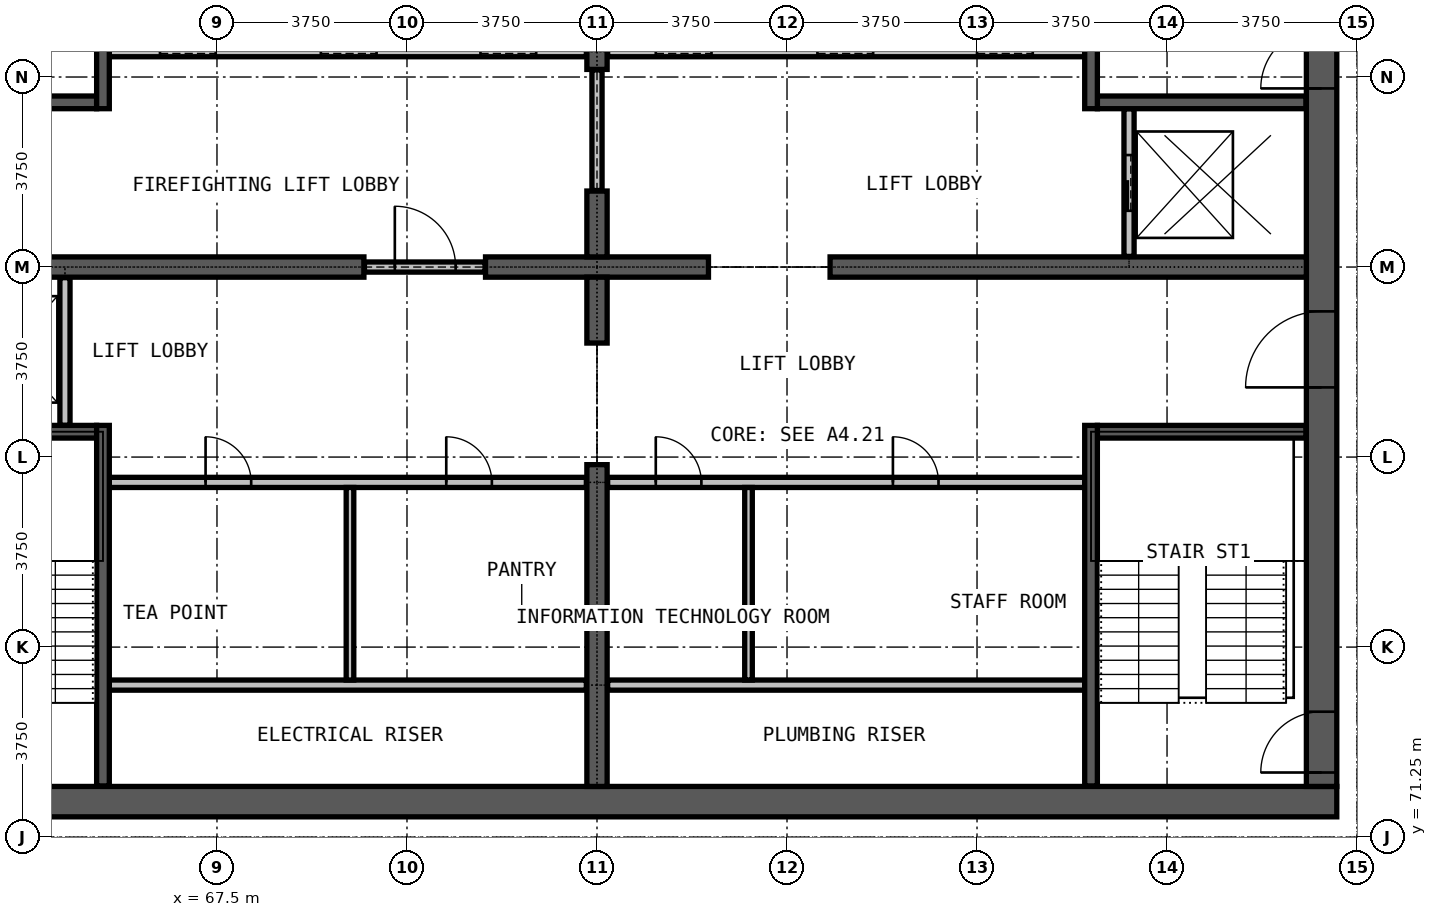
"""IFC4 building model, lengths in metres.
Left out: names, types, materials, properties, quantities, classifications, styles, units other than length and angle.
Written with IfcOpenShell. Run it as: python <this file> out.ifc"""

import sys

from ifc_helpers import new_model, si_unit, direction, frame, frame_2d, origin, place, context, subcontext, project, spatial, rectangle, extrude, element, fill, save


model = new_model("IFC4")
c1 = context("Model", 3, precision=1e-05, world=origin(), true_north=direction((0.0, 1.0)))
c2 = subcontext(c1, "Body", "Model", "MODEL_VIEW")
j1 = project(units=[si_unit("LENGTHUNIT", "METRE"), si_unit("PLANEANGLEUNIT", "RADIAN")], contexts=[c1])
p1 = place(None, origin())
s1 = spatial("IfcSite", under=j1, at=p1, CompositionType="ELEMENT")
p2 = place(p1, origin())
s2 = spatial("IfcBuilding", under=s1, at=p2, CompositionType="ELEMENT")
p3 = place(p2, frame((0.0, 0.0, 239.1)))
s3 = spatial("IfcBuildingStorey", under=s2, at=p3, CompositionType="ELEMENT", Elevation=239.1)
p4 = place(p3, frame((60.4, 71.95, 0.0), z_axis=(0.0, 0.0, 1.0), x_axis=(1.0, 0.0, 0.0)))
e1 = element("IfcWall", 1, at=p4, inside=s3, PredefinedType="SHEAR", context=c2, shape_type="SweptSolid", body=[
    extrude(rectangle(XDim=29.2, YDim=0.6, at=frame_2d((14.6, 0.0))), origin(), (0.0, 0.0, 1.0), 3.6),
])
p5 = place(p3, frame((89.3, 72.25, 0.0), z_axis=(0.0, 0.0, 1.0), x_axis=(0.0, 1.0, 0.0)))
e2 = element("IfcWall", 2, at=p5, inside=s3, PredefinedType="SHEAR", context=c2, shape_type="SweptSolid", body=[
    extrude(rectangle(XDim=20.5, YDim=0.6, at=frame_2d((10.25, 0.0))), origin(), (0.0, 0.0, 1.0), 3.6),
])
p6 = place(p5, frame((0.275, 0.0, 0.0)))
e3 = element("IfcOpeningElement", 3, at=p6, cuts=e2, PredefinedType="OPENING", context=c2, shape_type="SweptSolid", body=[
    extrude(rectangle(XDim=1.2, YDim=2.2, at=frame_2d((0.6, 1.1))), frame((0.0, 0.31, 0.0), z_axis=(0.0, -1.0, 0.0), x_axis=(1.0, 0.0, 0.0)), (0.0, 0.0, 1.0), 0.62),
])
p7 = place(p5, frame((13.775, 0.0, 0.0)))
e4 = element("IfcOpeningElement", 4, at=p7, cuts=e2, PredefinedType="OPENING", context=c2, shape_type="SweptSolid", body=[
    extrude(rectangle(XDim=1.2, YDim=2.2, at=frame_2d((0.6, 1.1))), frame((0.0, 0.31, 0.0), z_axis=(0.0, -1.0, 0.0), x_axis=(1.0, 0.0, 0.0)), (0.0, 0.0, 1.0), 0.62),
])
p8 = place(p5, frame((7.875, 0.0, 0.0)))
e5 = element("IfcOpeningElement", 5, at=p8, cuts=e2, PredefinedType="OPENING", context=c2, shape_type="SweptSolid", body=[
    extrude(rectangle(XDim=1.5, YDim=2.2, at=frame_2d((0.75, 1.1))), frame((0.0, 0.31, 0.0), z_axis=(0.0, -1.0, 0.0), x_axis=(1.0, 0.0, 0.0)), (0.0, 0.0, 1.0), 0.62),
])
p9 = place(p3, frame((61.0, 82.5, 0.0), z_axis=(0.0, 0.0, 1.0), x_axis=(1.0, 0.0, 0.0)))
e6 = element("IfcWall", 6, at=p9, inside=s3, PredefinedType="SHEAR", context=c2, shape_type="SweptSolid", body=[
    extrude(rectangle(XDim=9.4, YDim=0.4, at=frame_2d((4.7, 0.0))), origin(), (0.0, 0.0, 1.0), 3.6),
])
p10 = place(p3, frame((72.8, 82.5, 0.0), z_axis=(0.0, 0.0, 1.0), x_axis=(1.0, 0.0, 0.0)))
e7 = element("IfcWall", 7, at=p10, inside=s3, PredefinedType="SHEAR", context=c2, shape_type="SweptSolid", body=[
    extrude(rectangle(XDim=4.4, YDim=0.4, at=frame_2d((2.2, 0.0))), origin(), (0.0, 0.0, 1.0), 3.6),
])
p11 = place(p3, frame((79.6, 82.5, 0.0), z_axis=(0.0, 0.0, 1.0), x_axis=(1.0, 0.0, 0.0)))
e8 = element("IfcWall", 8, at=p11, inside=s3, PredefinedType="SHEAR", context=c2, shape_type="SweptSolid", body=[
    extrude(rectangle(XDim=9.4, YDim=0.4, at=frame_2d((4.7, 0.0))), origin(), (0.0, 0.0, 1.0), 3.6),
])
p12 = place(p3, frame((75.0, 72.25, 0.0), z_axis=(0.0, 0.0, 1.0), x_axis=(0.0, 1.0, 0.0)))
e9 = element("IfcWall", 9, at=p12, inside=s3, PredefinedType="SHEAR", context=c2, shape_type="SweptSolid", body=[
    extrude(rectangle(XDim=6.35, YDim=0.4, at=frame_2d((3.175, 0.0))), origin(), (0.0, 0.0, 1.0), 3.6),
])
for number, where, z_axis, x_axis in (
    (10, (75.0, 81.0, 0.0), (0.0, 0.0, 1.0), (0.0, 1.0, 0.0)),
    (11, (75.0, 82.7, 0.0), (0.0, 0.0, 1.0), (0.0, 1.0, 0.0)),
):
    element("IfcWall", number, at=place(p3, frame(where, z_axis=z_axis, x_axis=x_axis)), inside=s3, PredefinedType="SHEAR", context=c2, shape_type="SweptSolid", body=[
        extrude(rectangle(XDim=1.3, YDim=0.4, at=frame_2d((0.65, 0.0))), origin(), (0.0, 0.0, 1.0), 3.6),
    ])
p13 = place(p3, frame((75.0, 86.4, 0.0), z_axis=(0.0, 0.0, 1.0), x_axis=(0.0, 1.0, 0.0)))
e12 = element("IfcWall", 12, at=p13, inside=s3, PredefinedType="SHEAR", context=c2, shape_type="SweptSolid", body=[
    extrude(rectangle(XDim=6.35, YDim=0.4, at=frame_2d((3.175, 0.0))), origin(), (0.0, 0.0, 1.0), 3.6),
])
for number, where, z_axis, x_axis in (
    (13, (65.375, 74.25, 0.0), (0.0, 0.0, 1.0), (1.0, 0.0, 0.0)),
    (14, (75.21, 74.25, 0.0), (0.0, 0.0, 1.0), (1.0, 0.0, 0.0)),
):
    element("IfcWall", number, at=place(p3, frame(where, z_axis=z_axis, x_axis=x_axis)), inside=s3, PredefinedType="PARTITIONING", context=c2, shape_type="SweptSolid", body=[
        extrude(rectangle(XDim=9.415, YDim=0.2, at=frame_2d((4.708, 0.0))), origin(), (0.0, 0.0, 1.0), 3.3),
    ])
p14 = place(p3, frame((65.375, 78.25, 0.0), z_axis=(0.0, 0.0, 1.0), x_axis=(1.0, 0.0, 0.0)))
e15 = element("IfcWall", 15, at=p14, inside=s3, PredefinedType="PARTITIONING", context=c2, shape_type="SweptSolid", body=[
    extrude(rectangle(XDim=9.415, YDim=0.2, at=frame_2d((4.708, 0.0))), origin(), (0.0, 0.0, 1.0), 3.3),
])
p15 = place(p14, frame((1.9, 0.0, 0.0)))
e16 = element("IfcOpeningElement", 16, at=p15, cuts=e15, PredefinedType="OPENING", context=c2, shape_type="SweptSolid", body=[
    extrude(rectangle(XDim=0.9, YDim=2.2, at=frame_2d((0.45, 1.1))), frame((0.0, 0.11, 0.0), z_axis=(0.0, -1.0, 0.0), x_axis=(1.0, 0.0, 0.0)), (0.0, 0.0, 1.0), 0.22),
])
p16 = place(p14, frame((6.65, 0.0, 0.0)))
e17 = element("IfcOpeningElement", 17, at=p16, cuts=e15, PredefinedType="OPENING", context=c2, shape_type="SweptSolid", body=[
    extrude(rectangle(XDim=0.9, YDim=2.2, at=frame_2d((0.45, 1.1))), frame((0.0, 0.11, 0.0), z_axis=(0.0, -1.0, 0.0), x_axis=(1.0, 0.0, 0.0)), (0.0, 0.0, 1.0), 0.22),
])
p17 = place(p3, frame((75.21, 78.25, 0.0), z_axis=(0.0, 0.0, 1.0), x_axis=(1.0, 0.0, 0.0)))
e18 = element("IfcWall", 18, at=p17, inside=s3, PredefinedType="PARTITIONING", context=c2, shape_type="SweptSolid", body=[
    extrude(rectangle(XDim=9.415, YDim=0.2, at=frame_2d((4.708, 0.0))), origin(), (0.0, 0.0, 1.0), 3.3),
])
p18 = place(p17, frame((0.95, 0.0, 0.0)))
e19 = element("IfcOpeningElement", 19, at=p18, cuts=e18, PredefinedType="OPENING", context=c2, shape_type="SweptSolid", body=[
    extrude(rectangle(XDim=0.9, YDim=2.2, at=frame_2d((0.45, 1.1))), frame((0.0, 0.11, 0.0), z_axis=(0.0, -1.0, 0.0), x_axis=(1.0, 0.0, 0.0)), (0.0, 0.0, 1.0), 0.22),
])
p19 = place(p17, frame((5.63, 0.0, 0.0)))
e20 = element("IfcOpeningElement", 20, at=p19, cuts=e18, PredefinedType="OPENING", context=c2, shape_type="SweptSolid", body=[
    extrude(rectangle(XDim=0.9, YDim=2.2, at=frame_2d((0.45, 1.1))), frame((0.0, 0.11, 0.0), z_axis=(0.0, -1.0, 0.0), x_axis=(1.0, 0.0, 0.0)), (0.0, 0.0, 1.0), 0.22),
])
p20 = place(p3, frame((70.41, 82.5, 0.0), z_axis=(0.0, 0.0, 1.0), x_axis=(1.0, 0.0, 0.0)))
e21 = element("IfcWall", 21, at=p20, inside=s3, PredefinedType="PARTITIONING", context=c2, shape_type="SweptSolid", body=[
    extrude(rectangle(XDim=2.38, YDim=0.2, at=frame_2d((1.19, 0.0))), origin(), (0.0, 0.0, 1.0), 2.4),
])
p21 = place(p20, frame((0.6, 0.0, 0.0)))
e22 = element("IfcOpeningElement", 22, at=p21, cuts=e21, PredefinedType="OPENING", context=c2, shape_type="SweptSolid", body=[
    extrude(rectangle(XDim=1.2, YDim=2.2, at=frame_2d((0.6, 1.1))), frame((0.0, 0.11, 0.0), z_axis=(0.0, -1.0, 0.0), x_axis=(1.0, 0.0, 0.0)), (0.0, 0.0, 1.0), 0.22),
])
p22 = place(p3, frame((75.0, 84.01, 0.0), z_axis=(0.0, 0.0, 1.0), x_axis=(0.0, 1.0, 0.0)))
e23 = element("IfcWall", 23, at=p22, inside=s3, PredefinedType="PARTITIONING", context=c2, shape_type="SweptSolid", body=[
    extrude(rectangle(XDim=2.38, YDim=0.2, at=frame_2d((1.19, 0.0))), origin(), (0.0, 0.0, 1.0), 2.4),
])
for number, where, z_axis, x_axis in (
    (24, (70.125, 74.35, 0.0), (0.0, 0.0, 1.0), (0.0, 1.0, 0.0)),
    (25, (77.99, 74.35, 0.0), (0.0, 0.0, 1.0), (0.0, 1.0, 0.0)),
):
    element("IfcWall", number, at=place(p3, frame(where, z_axis=z_axis, x_axis=x_axis)), inside=s3, PredefinedType="PARTITIONING", context=c2, shape_type="SweptSolid", body=[
        extrude(rectangle(XDim=3.8, YDim=0.15, at=frame_2d((1.9, 0.0))), origin(), (0.0, 0.0, 1.0), 3.3),
    ])
p23 = place(p3, frame((65.375, 86.75, 0.0), z_axis=(0.0, 0.0, 1.0), x_axis=(1.0, 0.0, 0.0)))
e26 = element("IfcWall", 26, at=p23, inside=s3, PredefinedType="PARTITIONING", context=c2, shape_type="SweptSolid", body=[
    extrude(rectangle(XDim=9.415, YDim=0.2, at=frame_2d((4.708, 0.0))), origin(), (0.0, 0.0, 1.0), 3.3),
])
p24 = place(p23, frame((1.0, 0.0, 0.0)))
e27 = element("IfcOpeningElement", 27, at=p24, cuts=e26, PredefinedType="OPENING", context=c2, shape_type="SweptSolid", body=[
    extrude(rectangle(XDim=1.1, YDim=2.2, at=frame_2d((0.55, 1.1))), frame((0.0, 0.11, 0.0), z_axis=(0.0, -1.0, 0.0), x_axis=(1.0, 0.0, 0.0)), (0.0, 0.0, 1.0), 0.22),
])
p25 = place(p23, frame((4.175, 0.0, 0.0)))
e28 = element("IfcOpeningElement", 28, at=p25, cuts=e26, PredefinedType="OPENING", context=c2, shape_type="SweptSolid", body=[
    extrude(rectangle(XDim=1.1, YDim=2.2, at=frame_2d((0.55, 1.1))), frame((0.0, 0.11, 0.0), z_axis=(0.0, -1.0, 0.0), x_axis=(1.0, 0.0, 0.0)), (0.0, 0.0, 1.0), 0.22),
])
p26 = place(p23, frame((7.325, 0.0, 0.0)))
e29 = element("IfcOpeningElement", 29, at=p26, cuts=e26, PredefinedType="OPENING", context=c2, shape_type="SweptSolid", body=[
    extrude(rectangle(XDim=1.1, YDim=2.2, at=frame_2d((0.55, 1.1))), frame((0.0, 0.11, 0.0), z_axis=(0.0, -1.0, 0.0), x_axis=(1.0, 0.0, 0.0)), (0.0, 0.0, 1.0), 0.22),
])
p27 = place(p3, frame((75.21, 86.75, 0.0), z_axis=(0.0, 0.0, 1.0), x_axis=(1.0, 0.0, 0.0)))
e30 = element("IfcWall", 30, at=p27, inside=s3, PredefinedType="PARTITIONING", context=c2, shape_type="SweptSolid", body=[
    extrude(rectangle(XDim=9.415, YDim=0.2, at=frame_2d((4.708, 0.0))), origin(), (0.0, 0.0, 1.0), 3.3),
])
p28 = place(p27, frame((0.95, 0.0, 0.0)))
e31 = element("IfcOpeningElement", 31, at=p28, cuts=e30, PredefinedType="OPENING", context=c2, shape_type="SweptSolid", body=[
    extrude(rectangle(XDim=1.1, YDim=2.2, at=frame_2d((0.55, 1.1))), frame((0.0, 0.11, 0.0), z_axis=(0.0, -1.0, 0.0), x_axis=(1.0, 0.0, 0.0)), (0.0, 0.0, 1.0), 0.22),
])
p29 = place(p27, frame((4.14, 0.0, 0.0)))
e32 = element("IfcOpeningElement", 32, at=p29, cuts=e30, PredefinedType="OPENING", context=c2, shape_type="SweptSolid", body=[
    extrude(rectangle(XDim=1.1, YDim=2.2, at=frame_2d((0.55, 1.1))), frame((0.0, 0.11, 0.0), z_axis=(0.0, -1.0, 0.0), x_axis=(1.0, 0.0, 0.0)), (0.0, 0.0, 1.0), 0.22),
])
p30 = place(p27, frame((7.29, 0.0, 0.0)))
e33 = element("IfcOpeningElement", 33, at=p30, cuts=e30, PredefinedType="OPENING", context=c2, shape_type="SweptSolid", body=[
    extrude(rectangle(XDim=1.1, YDim=2.2, at=frame_2d((0.55, 1.1))), frame((0.0, 0.11, 0.0), z_axis=(0.0, -1.0, 0.0), x_axis=(1.0, 0.0, 0.0)), (0.0, 0.0, 1.0), 0.22),
])
p31 = place(p3, frame((64.5, 79.375, 0.0), z_axis=(0.0, 0.0, 1.0), x_axis=(0.0, 1.0, 0.0)))
e34 = element("IfcWall", 34, at=p31, inside=s3, PredefinedType="PARTITIONING", context=c2, shape_type="SweptSolid", body=[
    extrude(rectangle(XDim=2.915, YDim=0.2, at=frame_2d((1.458, 0.0))), origin(), (0.0, 0.0, 1.0), 3.3),
])
p32 = place(p3, frame((85.5, 82.71, 0.0), z_axis=(0.0, 0.0, 1.0), x_axis=(0.0, 1.0, 0.0)))
e35 = element("IfcWall", 35, at=p32, inside=s3, PredefinedType="PARTITIONING", context=c2, shape_type="SweptSolid", body=[
    extrude(rectangle(XDim=2.915, YDim=0.2, at=frame_2d((1.458, 0.0))), origin(), (0.0, 0.0, 1.0), 3.3),
])
p33 = place(p32, frame((0.9, 0.0, 0.0)))
e36 = element("IfcOpeningElement", 36, at=p33, cuts=e35, PredefinedType="OPENING", context=c2, shape_type="SweptSolid", body=[
    extrude(rectangle(XDim=1.1, YDim=2.2, at=frame_2d((0.55, 1.1))), frame((0.0, 0.11, 0.0), z_axis=(0.0, -1.0, 0.0), x_axis=(1.0, 0.0, 0.0)), (0.0, 0.0, 1.0), 0.22),
])
for number, where, z_axis, x_axis in (
    (37, (61.01, 79.25, 0.0), (0.0, 0.0, 1.0), (1.0, 0.0, 0.0)),
    (38, (84.875, 79.25, 0.0), (0.0, 0.0, 1.0), (1.0, 0.0, 0.0)),
):
    element("IfcWall", number, at=place(p3, frame(where, z_axis=z_axis, x_axis=x_axis)), inside=s3, PredefinedType="PARTITIONING", context=c2, shape_type="SweptSolid", body=[
        extrude(rectangle(XDim=4.115, YDim=0.25, at=frame_2d((2.058, 0.0))), origin(), (0.0, 0.0, 1.0), 3.3),
    ])
p34 = place(p3, frame((61.01, 85.75, 0.0), z_axis=(0.0, 0.0, 1.0), x_axis=(1.0, 0.0, 0.0)))
e39 = element("IfcWall", 39, at=p34, inside=s3, PredefinedType="PARTITIONING", context=c2, shape_type="SweptSolid", body=[
    extrude(rectangle(XDim=4.115, YDim=0.25, at=frame_2d((2.058, 0.0))), origin(), (0.0, 0.0, 1.0), 3.3),
])
p35 = place(p34, frame((1.45, 0.0, 0.0)))
e40 = element("IfcOpeningElement", 40, at=p35, cuts=e39, PredefinedType="OPENING", context=c2, shape_type="SweptSolid", body=[
    extrude(rectangle(XDim=1.2, YDim=2.2, at=frame_2d((0.6, 1.1))), frame((0.0, 0.135, 0.0), z_axis=(0.0, -1.0, 0.0), x_axis=(1.0, 0.0, 0.0)), (0.0, 0.0, 1.0), 0.27),
])
p36 = place(p3, frame((84.875, 85.75, 0.0), z_axis=(0.0, 0.0, 1.0), x_axis=(1.0, 0.0, 0.0)))
e41 = element("IfcWall", 41, at=p36, inside=s3, PredefinedType="PARTITIONING", context=c2, shape_type="SweptSolid", body=[
    extrude(rectangle(XDim=4.115, YDim=0.25, at=frame_2d((2.058, 0.0))), origin(), (0.0, 0.0, 1.0), 3.3),
])
for number, where, z_axis, x_axis in (
    (42, (65.25, 72.26, 0.0), (0.0, 0.0, 1.0), (0.0, 1.0, 0.0)),
    (43, (65.25, 85.625, 0.0), (0.0, 0.0, 1.0), (0.0, 1.0, 0.0)),
    (44, (84.75, 72.26, 0.0), (0.0, 0.0, 1.0), (0.0, 1.0, 0.0)),
    (45, (84.75, 85.625, 0.0), (0.0, 0.0, 1.0), (0.0, 1.0, 0.0)),
):
    element("IfcWall", number, at=place(p3, frame(where, z_axis=z_axis, x_axis=x_axis)), inside=s3, PredefinedType="PARTITIONING", context=c2, shape_type="SweptSolid", body=[
        extrude(rectangle(XDim=7.115, YDim=0.25, at=frame_2d((3.558, 0.0))), origin(), (0.0, 0.0, 1.0), 3.3),
    ])
p37 = place(p28, origin())
e46 = element("IfcDoor", 46, at=p37, inside=s3, OperationType="DOUBLE_DOOR_SLIDING", PredefinedType="DOOR", context=c2, shape_type="SweptSolid", body=[
    extrude(rectangle(XDim=1.1, YDim=2.2, at=frame_2d((0.55, 1.1))), frame((0.0, 0.025, 0.0), z_axis=(0.0, -1.0, 0.0), x_axis=(1.0, 0.0, 0.0)), (0.0, 0.0, 1.0), 0.05),
])
fill(e31, e46)
p38 = place(p29, origin())
e47 = element("IfcDoor", 47, at=p38, inside=s3, OperationType="DOUBLE_DOOR_SLIDING", PredefinedType="DOOR", context=c2, shape_type="SweptSolid", body=[
    extrude(rectangle(XDim=1.1, YDim=2.2, at=frame_2d((0.55, 1.1))), frame((0.0, 0.025, 0.0), z_axis=(0.0, -1.0, 0.0), x_axis=(1.0, 0.0, 0.0)), (0.0, 0.0, 1.0), 0.05),
])
fill(e32, e47)
p39 = place(p30, origin())
e48 = element("IfcDoor", 48, at=p39, inside=s3, OperationType="DOUBLE_DOOR_SLIDING", PredefinedType="DOOR", context=c2, shape_type="SweptSolid", body=[
    extrude(rectangle(XDim=1.1, YDim=2.2, at=frame_2d((0.55, 1.1))), frame((0.0, 0.025, 0.0), z_axis=(0.0, -1.0, 0.0), x_axis=(1.0, 0.0, 0.0)), (0.0, 0.0, 1.0), 0.05),
])
fill(e33, e48)
p40 = place(p24, origin())
e49 = element("IfcDoor", 49, at=p40, inside=s3, OperationType="DOUBLE_DOOR_SLIDING", PredefinedType="DOOR", context=c2, shape_type="SweptSolid", body=[
    extrude(rectangle(XDim=1.1, YDim=2.2, at=frame_2d((0.55, 1.1))), frame((0.0, 0.025, 0.0), z_axis=(0.0, -1.0, 0.0), x_axis=(1.0, 0.0, 0.0)), (0.0, 0.0, 1.0), 0.05),
])
fill(e27, e49)
p41 = place(p25, origin())
e50 = element("IfcDoor", 50, at=p41, inside=s3, OperationType="DOUBLE_DOOR_SLIDING", PredefinedType="DOOR", context=c2, shape_type="SweptSolid", body=[
    extrude(rectangle(XDim=1.1, YDim=2.2, at=frame_2d((0.55, 1.1))), frame((0.0, 0.025, 0.0), z_axis=(0.0, -1.0, 0.0), x_axis=(1.0, 0.0, 0.0)), (0.0, 0.0, 1.0), 0.05),
])
fill(e28, e50)
p42 = place(p26, origin())
e51 = element("IfcDoor", 51, at=p42, inside=s3, OperationType="DOUBLE_DOOR_SLIDING", PredefinedType="DOOR", context=c2, shape_type="SweptSolid", body=[
    extrude(rectangle(XDim=1.1, YDim=2.2, at=frame_2d((0.55, 1.1))), frame((0.0, 0.025, 0.0), z_axis=(0.0, -1.0, 0.0), x_axis=(1.0, 0.0, 0.0)), (0.0, 0.0, 1.0), 0.05),
])
fill(e29, e51)
p43 = place(p33, origin())
e52 = element("IfcDoor", 52, at=p43, inside=s3, OperationType="DOUBLE_DOOR_SLIDING", PredefinedType="DOOR", context=c2, shape_type="SweptSolid", body=[
    extrude(rectangle(XDim=1.1, YDim=2.2, at=frame_2d((0.55, 1.1))), frame((0.0, 0.025, 0.0), z_axis=(0.0, -1.0, 0.0), x_axis=(1.0, 0.0, 0.0)), (0.0, 0.0, 1.0), 0.05),
])
fill(e36, e52)
p44 = place(p21, origin())
e53 = element("IfcDoor", 53, at=p44, inside=s3, OperationType="SINGLE_SWING_LEFT", PredefinedType="DOOR", context=c2, shape_type="SweptSolid", body=[
    extrude(rectangle(XDim=1.2, YDim=2.2, at=frame_2d((0.6, 1.1))), frame((0.0, 0.025, 0.0), z_axis=(0.0, -1.0, 0.0), x_axis=(1.0, 0.0, 0.0)), (0.0, 0.0, 1.0), 0.05),
])
fill(e22, e53)
p45 = place(p6, origin())
e54 = element("IfcDoor", 54, at=p45, inside=s3, OperationType="SINGLE_SWING_RIGHT", PredefinedType="DOOR", context=c2, shape_type="SweptSolid", body=[
    extrude(rectangle(XDim=1.2, YDim=2.2, at=frame_2d((0.6, 1.1))), frame((0.0, 0.025, 0.0), z_axis=(0.0, -1.0, 0.0), x_axis=(1.0, 0.0, 0.0)), (0.0, 0.0, 1.0), 0.05),
])
fill(e3, e54)
p46 = place(p7, origin())
e55 = element("IfcDoor", 55, at=p46, inside=s3, OperationType="SINGLE_SWING_LEFT", PredefinedType="DOOR", context=c2, shape_type="SweptSolid", body=[
    extrude(rectangle(XDim=1.2, YDim=2.2, at=frame_2d((0.6, 1.1))), frame((0.0, 0.025, 0.0), z_axis=(0.0, -1.0, 0.0), x_axis=(1.0, 0.0, 0.0)), (0.0, 0.0, 1.0), 0.05),
])
fill(e4, e55)
p47 = place(p8, origin())
e56 = element("IfcDoor", 56, at=p47, inside=s3, OperationType="DOUBLE_DOOR_SINGLE_SWING", PredefinedType="DOOR", context=c2, shape_type="SweptSolid", body=[
    extrude(rectangle(XDim=1.5, YDim=2.2, at=frame_2d((0.75, 1.1))), frame((0.0, 0.025, 0.0), z_axis=(0.0, -1.0, 0.0), x_axis=(1.0, 0.0, 0.0)), (0.0, 0.0, 1.0), 0.05),
])
fill(e5, e56)
p48 = place(p15, origin())
e57 = element("IfcDoor", 57, at=p48, inside=s3, OperationType="SINGLE_SWING_LEFT", PredefinedType="DOOR", context=c2, shape_type="SweptSolid", body=[
    extrude(rectangle(XDim=0.9, YDim=2.2, at=frame_2d((0.45, 1.1))), frame((0.0, 0.025, 0.0), z_axis=(0.0, -1.0, 0.0), x_axis=(1.0, 0.0, 0.0)), (0.0, 0.0, 1.0), 0.05),
])
fill(e16, e57)
p49 = place(p16, origin())
e58 = element("IfcDoor", 58, at=p49, inside=s3, OperationType="SINGLE_SWING_RIGHT", PredefinedType="DOOR", context=c2, shape_type="SweptSolid", body=[
    extrude(rectangle(XDim=0.9, YDim=2.2, at=frame_2d((0.45, 1.1))), frame((0.0, 0.025, 0.0), z_axis=(0.0, -1.0, 0.0), x_axis=(1.0, 0.0, 0.0)), (0.0, 0.0, 1.0), 0.05),
])
fill(e17, e58)
p50 = place(p18, origin())
e59 = element("IfcDoor", 59, at=p50, inside=s3, OperationType="SINGLE_SWING_RIGHT", PredefinedType="DOOR", context=c2, shape_type="SweptSolid", body=[
    extrude(rectangle(XDim=0.9, YDim=2.2, at=frame_2d((0.45, 1.1))), frame((0.0, 0.025, 0.0), z_axis=(0.0, -1.0, 0.0), x_axis=(1.0, 0.0, 0.0)), (0.0, 0.0, 1.0), 0.05),
])
fill(e19, e59)
p51 = place(p19, origin())
e60 = element("IfcDoor", 60, at=p51, inside=s3, OperationType="SINGLE_SWING_LEFT", PredefinedType="DOOR", context=c2, shape_type="SweptSolid", body=[
    extrude(rectangle(XDim=0.9, YDim=2.2, at=frame_2d((0.45, 1.1))), frame((0.0, 0.025, 0.0), z_axis=(0.0, -1.0, 0.0), x_axis=(1.0, 0.0, 0.0)), (0.0, 0.0, 1.0), 0.05),
])
fill(e20, e60)
save(model, sys.argv[1])
